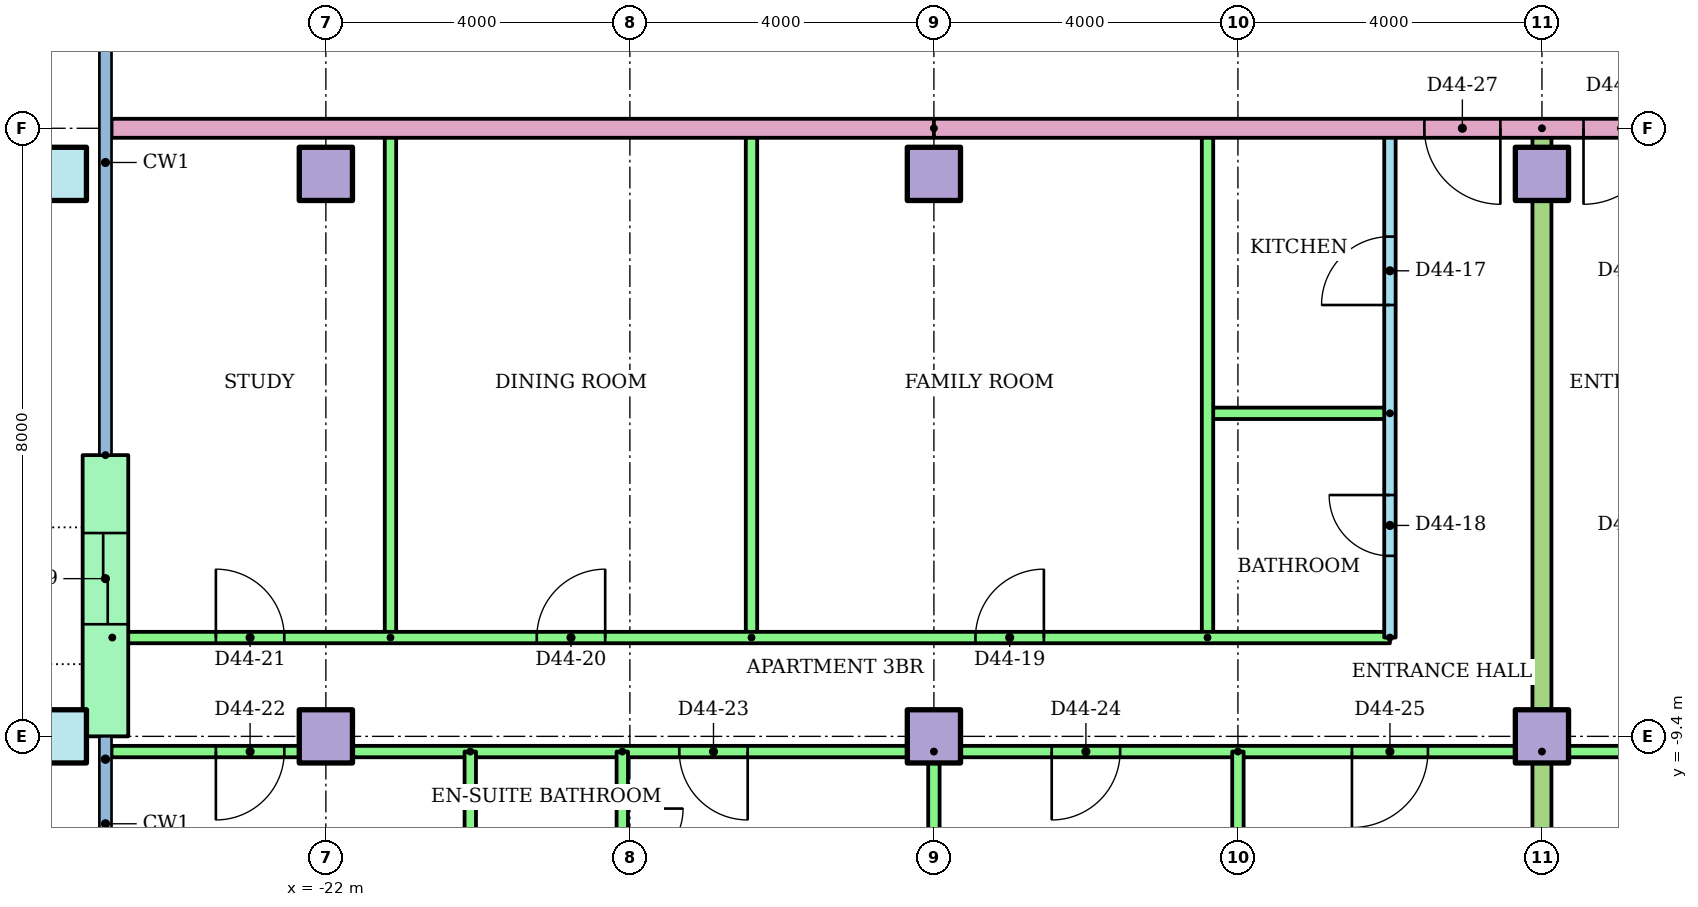
"""IFC4 building model, lengths in metres.
Left out: names, types, materials, properties, quantities, classifications, styles, units other than length and angle.
Written with IfcOpenShell. Run it as: python <this file> out.ifc"""

import sys

from ifc_helpers import new_model, si_unit, direction, frame, frame_2d, origin, origin_2d, place, context, subcontext, project, spatial, rectangle, hollow_rectangle, extrude, element, fill, save


model = new_model("IFC4")
c1 = context("Model", 3, precision=1e-05, world=origin(), true_north=direction((0.0, 1.0)))
c2 = subcontext(c1, "Body", "Model", "MODEL_VIEW")
j1 = project(units=[si_unit("LENGTHUNIT", "METRE"), si_unit("PLANEANGLEUNIT", "RADIAN")], contexts=[c1])
p1 = place(None, origin())
s1 = spatial("IfcSite", under=j1, at=p1, CompositionType="ELEMENT")
p2 = place(p1, origin())
s2 = spatial("IfcBuilding", under=s1, at=p2, CompositionType="ELEMENT")
p3 = place(p2, frame((0.0, 0.0, 171.7)))
s3 = spatial("IfcBuildingStorey", under=s2, at=p3, CompositionType="ELEMENT", Elevation=171.7)
p4 = place(p3, frame((-25.5, -9.4, 0.0)))
e1 = element("IfcColumn", 1, at=p4, inside=s3, PredefinedType="COLUMN", context=c2, shape_type="SweptSolid", body=[
    extrude(hollow_rectangle(XDim=0.7, YDim=0.7, WallThickness=0.036, at=origin_2d()), origin(), (0.0, 0.0, 1.0), 3.2),
])
for number, where in (
    (2, (-22.0, -9.4, 0.0)),
    (3, (-14.0, -9.4, 0.0)),
    (4, (-6.0, -9.4, 0.0)),
):
    element("IfcColumn", number, at=place(p3, frame(where)), inside=s3, PredefinedType="COLUMN", context=c2, shape_type="SweptSolid", body=[
        extrude(rectangle(XDim=0.7, YDim=0.7, at=origin_2d()), origin(), (0.0, 0.0, 1.0), 3.2),
    ])
p5 = place(p3, frame((-25.5, -2.0, 0.0)))
e5 = element("IfcColumn", 5, at=p5, inside=s3, PredefinedType="COLUMN", context=c2, shape_type="SweptSolid", body=[
    extrude(hollow_rectangle(XDim=0.7, YDim=0.7, WallThickness=0.036, at=origin_2d()), origin(), (0.0, 0.0, 1.0), 3.2),
])
for number, where in (
    (6, (-22.0, -2.0, 0.0)),
    (7, (-14.0, -2.0, 0.0)),
    (8, (-6.0, -2.0, 0.0)),
):
    element("IfcColumn", number, at=place(p3, frame(where)), inside=s3, PredefinedType="COLUMN", context=c2, shape_type="SweptSolid", body=[
        extrude(rectangle(XDim=0.7, YDim=0.7, at=origin_2d()), origin(), (0.0, 0.0, 1.0), 3.2),
    ])
p6 = place(p3, frame((-24.9, -5.7, 0.0), z_axis=(0.0, 0.0, 1.0), x_axis=(0.0, -1.0, 0.0)))
e9 = element("IfcWall", 9, at=p6, inside=s3, PredefinedType="STANDARD", context=c2, shape_type="SweptSolid", body=[
    extrude(rectangle(XDim=3.7, YDim=0.6, at=frame_2d((1.85, 0.0))), origin(), (0.0, 0.0, 1.0), 2.92),
])
p7 = place(p6, frame((1.025, 0.0, 0.0)))
e10 = element("IfcOpeningElement", 10, at=p7, cuts=e9, PredefinedType="OPENING", context=c2, shape_type="SweptSolid", body=[
    extrude(rectangle(XDim=1.2, YDim=2.1, at=frame_2d((0.6, 1.05))), frame((0.0, 0.31, 0.0), z_axis=(0.0, -1.0, 0.0), x_axis=(1.0, 0.0, 0.0)), (0.0, 0.0, 1.0), 0.62),
])
p8 = place(p3, frame((-8.0, -8.1, 0.0), z_axis=(0.0, 0.0, 1.0), x_axis=(0.0, 1.0, 0.0)))
e11 = element("IfcWall", 11, at=p8, inside=s3, PredefinedType="PARTITIONING", context=c2, shape_type="SweptSolid", body=[
    extrude(rectangle(XDim=6.7, YDim=0.15, at=frame_2d((3.35, 0.0))), origin(), (0.0, 0.0, 1.0), 2.4),
])
p9 = place(p8, frame((4.375, 0.0, 0.0)))
e12 = element("IfcOpeningElement", 12, at=p9, cuts=e11, PredefinedType="OPENING", context=c2, shape_type="SweptSolid", body=[
    extrude(rectangle(XDim=0.9, YDim=2.1, at=frame_2d((0.45, 1.05))), frame((0.0, 0.085, 0.0), z_axis=(0.0, -1.0, 0.0), x_axis=(1.0, 0.0, 0.0)), (0.0, 0.0, 1.0), 0.17),
])
p10 = place(p8, frame((1.075, 0.0, 0.0)))
e13 = element("IfcOpeningElement", 13, at=p10, cuts=e11, PredefinedType="OPENING", context=c2, shape_type="SweptSolid", body=[
    extrude(rectangle(XDim=0.8, YDim=2.1, at=frame_2d((0.4, 1.05))), frame((0.0, 0.085, 0.0), z_axis=(0.0, -1.0, 0.0), x_axis=(1.0, 0.0, 0.0)), (0.0, 0.0, 1.0), 0.17),
])
p11 = place(p3, frame((-8.0, -5.15, 0.0), z_axis=(0.0, 0.0, 1.0), x_axis=(-1.0, 0.0, 0.0)))
e14 = element("IfcWall", 14, at=p11, inside=s3, PredefinedType="PARTITIONING", context=c2, shape_type="SweptSolid", body=[
    extrude(rectangle(XDim=2.4, YDim=0.15, at=frame_2d((1.2, 0.0))), origin(), (0.0, 0.0, 1.0), 2.4),
])
for number, where, z_axis, x_axis in (
    (15, (-10.4, -8.1, 0.0), (0.0, 0.0, 1.0), (0.0, 1.0, 0.0)),
    (16, (-16.4, -8.1, 0.0), (0.0, 0.0, 1.0), (0.0, 1.0, 0.0)),
    (17, (-21.15, -8.1, 0.0), (0.0, 0.0, 1.0), (0.0, 1.0, 0.0)),
):
    element("IfcWall", number, at=place(p3, frame(where, z_axis=z_axis, x_axis=x_axis)), inside=s3, PredefinedType="PARTITIONING", context=c2, shape_type="SweptSolid", body=[
        extrude(rectangle(XDim=6.7, YDim=0.15, at=frame_2d((3.35, 0.0))), origin(), (0.0, 0.0, 1.0), 2.4),
    ])
p12 = place(p3, frame((-24.81, -8.1, 0.0)))
e18 = element("IfcWall", 18, at=p12, inside=s3, PredefinedType="PARTITIONING", context=c2, shape_type="SweptSolid", body=[
    extrude(rectangle(XDim=16.81, YDim=0.15, at=frame_2d((8.405, 0.0))), origin(), (0.0, 0.0, 1.0), 2.4),
])
p13 = place(p12, frame((11.357, 0.0, 0.0)))
e19 = element("IfcOpeningElement", 19, at=p13, cuts=e18, PredefinedType="OPENING", context=c2, shape_type="SweptSolid", body=[
    extrude(rectangle(XDim=0.9, YDim=2.1, at=frame_2d((0.45, 1.05))), frame((0.0, 0.085, 0.0), z_axis=(0.0, -1.0, 0.0), x_axis=(1.0, 0.0, 0.0)), (0.0, 0.0, 1.0), 0.17),
])
p14 = place(p12, frame((5.585, 0.0, 0.0)))
e20 = element("IfcOpeningElement", 20, at=p14, cuts=e18, PredefinedType="OPENING", context=c2, shape_type="SweptSolid", body=[
    extrude(rectangle(XDim=0.9, YDim=2.1, at=frame_2d((0.45, 1.05))), frame((0.0, 0.085, 0.0), z_axis=(0.0, -1.0, 0.0), x_axis=(1.0, 0.0, 0.0)), (0.0, 0.0, 1.0), 0.17),
])
p15 = place(p12, frame((1.363, 0.0, 0.0)))
e21 = element("IfcOpeningElement", 21, at=p15, cuts=e18, PredefinedType="OPENING", context=c2, shape_type="SweptSolid", body=[
    extrude(rectangle(XDim=0.9, YDim=2.1, at=frame_2d((0.45, 1.05))), frame((0.0, 0.085, 0.0), z_axis=(0.0, -1.0, 0.0), x_axis=(1.0, 0.0, 0.0)), (0.0, 0.0, 1.0), 0.17),
])
p16 = place(p3, frame((-6.0, -9.6, 0.0), z_axis=(0.0, 0.0, 1.0), x_axis=(-1.0, 0.0, 0.0)))
e22 = element("IfcWall", 22, at=p16, inside=s3, PredefinedType="PARTITIONING", context=c2, shape_type="SweptSolid", body=[
    extrude(rectangle(XDim=18.82, YDim=0.15, at=frame_2d((9.41, 0.0))), origin(), (0.0, 0.0, 1.0), 2.4),
])
p17 = place(p16, frame((16.547, 0.0, 0.0)))
e23 = element("IfcOpeningElement", 23, at=p17, cuts=e22, PredefinedType="OPENING", context=c2, shape_type="SweptSolid", body=[
    extrude(rectangle(XDim=0.9, YDim=2.1, at=frame_2d((0.45, 1.05))), frame((0.0, 0.085, 0.0), z_axis=(0.0, -1.0, 0.0), x_axis=(1.0, 0.0, 0.0)), (0.0, 0.0, 1.0), 0.17),
])
p18 = place(p16, frame((10.45, 0.0, 0.0)))
e24 = element("IfcOpeningElement", 24, at=p18, cuts=e22, PredefinedType="OPENING", context=c2, shape_type="SweptSolid", body=[
    extrude(rectangle(XDim=0.9, YDim=2.1, at=frame_2d((0.45, 1.05))), frame((0.0, 0.085, 0.0), z_axis=(0.0, -1.0, 0.0), x_axis=(1.0, 0.0, 0.0)), (0.0, 0.0, 1.0), 0.17),
])
p19 = place(p16, frame((5.55, 0.0, 0.0)))
e25 = element("IfcOpeningElement", 25, at=p19, cuts=e22, PredefinedType="OPENING", context=c2, shape_type="SweptSolid", body=[
    extrude(rectangle(XDim=0.9, YDim=2.1, at=frame_2d((0.45, 1.05))), frame((0.0, 0.085, 0.0), z_axis=(0.0, -1.0, 0.0), x_axis=(1.0, 0.0, 0.0)), (0.0, 0.0, 1.0), 0.17),
])
p20 = place(p16, frame((1.5, 0.0, 0.0)))
e26 = element("IfcOpeningElement", 26, at=p20, cuts=e22, PredefinedType="OPENING", context=c2, shape_type="SweptSolid", body=[
    extrude(rectangle(XDim=1.0, YDim=2.1, at=frame_2d((0.5, 1.05))), frame((0.0, 0.085, 0.0), z_axis=(0.0, -1.0, 0.0), x_axis=(1.0, 0.0, 0.0)), (0.0, 0.0, 1.0), 0.17),
])
p21 = place(p3, frame((-20.1, -9.6, 0.0), z_axis=(0.0, 0.0, 1.0), x_axis=(0.0, -1.0, 0.0)))
e27 = element("IfcWall", 27, at=p21, inside=s3, PredefinedType="PARTITIONING", context=c2, shape_type="SweptSolid", body=[
    extrude(rectangle(XDim=5.02, YDim=0.15, at=frame_2d((2.51, 0.0))), origin(), (0.0, 0.0, 1.0), 2.4),
])
p22 = place(p3, frame((-14.0, -9.6, 0.0), z_axis=(0.0, 0.0, 1.0), x_axis=(0.0, -1.0, 0.0)))
e28 = element("IfcWall", 28, at=p22, inside=s3, PredefinedType="PARTITIONING", context=c2, shape_type="SweptSolid", body=[
    extrude(rectangle(XDim=6.81, YDim=0.15, at=frame_2d((3.405, 0.0))), origin(), (0.0, 0.0, 1.0), 2.4),
])
p23 = place(p3, frame((-10.0, -9.6, 0.0), z_axis=(0.0, 0.0, 1.0), x_axis=(0.0, -1.0, 0.0)))
e29 = element("IfcWall", 29, at=p23, inside=s3, PredefinedType="PARTITIONING", context=c2, shape_type="SweptSolid", body=[
    extrude(rectangle(XDim=6.821, YDim=0.15, at=frame_2d((3.41, 0.0))), origin(), (0.0, 0.0, 1.0), 2.4),
])
p24 = place(p3, frame((-18.1, -9.6, 0.0), z_axis=(0.0, 0.0, 1.0), x_axis=(0.0, -1.0, 0.0)))
e30 = element("IfcWall", 30, at=p24, inside=s3, PredefinedType="PARTITIONING", context=c2, shape_type="SweptSolid", body=[
    extrude(rectangle(XDim=2.3, YDim=0.15, at=frame_2d((1.15, 0.0))), origin(), (0.0, 0.0, 1.0), 2.4),
])
p25 = place(p24, frame((0.75, 0.0, 0.0)))
e31 = element("IfcOpeningElement", 31, at=p25, cuts=e30, PredefinedType="OPENING", context=c2, shape_type="SweptSolid", body=[
    extrude(rectangle(XDim=0.8, YDim=2.1, at=frame_2d((0.4, 1.05))), frame((0.0, 0.085, 0.0), z_axis=(0.0, -1.0, 0.0), x_axis=(1.0, 0.0, 0.0)), (0.0, 0.0, 1.0), 0.17),
])
p26 = place(p3, frame((10.0, -9.6, 0.0), z_axis=(0.0, 0.0, 1.0), x_axis=(-1.0, 0.0, 0.0)))
e32 = element("IfcWall", 32, at=p26, inside=s3, PredefinedType="PARTITIONING", context=c2, shape_type="SweptSolid", body=[
    extrude(rectangle(XDim=16.0, YDim=0.15, at=frame_2d((8.0, 0.0))), origin(), (0.0, 0.0, 1.0), 2.4),
])
p27 = place(p26, frame((11.5, 0.0, 0.0)))
e33 = element("IfcOpeningElement", 33, at=p27, cuts=e32, PredefinedType="OPENING", context=c2, shape_type="SweptSolid", body=[
    extrude(rectangle(XDim=1.0, YDim=2.1, at=frame_2d((0.5, 1.05))), frame((0.0, 0.085, 0.0), z_axis=(0.0, -1.0, 0.0), x_axis=(1.0, 0.0, 0.0)), (0.0, 0.0, 1.0), 0.17),
])
p28 = place(p26, frame((5.55, 0.0, 0.0)))
e34 = element("IfcOpeningElement", 34, at=p28, cuts=e32, PredefinedType="OPENING", context=c2, shape_type="SweptSolid", body=[
    extrude(rectangle(XDim=0.9, YDim=2.1, at=frame_2d((0.45, 1.05))), frame((0.0, 0.085, 0.0), z_axis=(0.0, -1.0, 0.0), x_axis=(1.0, 0.0, 0.0)), (0.0, 0.0, 1.0), 0.17),
])
p29 = place(p26, frame((1.55, 0.0, 0.0)))
e35 = element("IfcOpeningElement", 35, at=p29, cuts=e32, PredefinedType="OPENING", context=c2, shape_type="SweptSolid", body=[
    extrude(rectangle(XDim=0.9, YDim=2.1, at=frame_2d((0.45, 1.05))), frame((0.0, 0.085, 0.0), z_axis=(0.0, -1.0, 0.0), x_axis=(1.0, 0.0, 0.0)), (0.0, 0.0, 1.0), 0.17),
])
p30 = place(p3, frame((-6.0, -1.4, 0.0), z_axis=(0.0, 0.0, 1.0), x_axis=(0.0, -1.0, 0.0)))
e36 = element("IfcWall", 36, at=p30, inside=s3, PredefinedType="PARTITIONING", context=c2, shape_type="SweptSolid", body=[
    extrude(rectangle(XDim=15.01, YDim=0.25, at=frame_2d((7.505, 0.0))), origin(), (0.0, 0.0, 1.0), 2.4),
])
p31 = place(p3, frame((-14.0, -1.4, 0.0), z_axis=(0.0, 0.0, 1.0), x_axis=(-1.0, 0.0, 0.0)))
e37 = element("IfcWall", 37, at=p31, inside=s3, PredefinedType="PARTITIONING", context=c2, shape_type="SweptSolid", body=[
    extrude(rectangle(XDim=10.82, YDim=0.25, at=frame_2d((5.41, 0.0))), origin(), (0.0, 0.0, 1.0), 2.4),
])
p32 = place(p3, frame((14.0, -1.4, 0.0), z_axis=(0.0, 0.0, 1.0), x_axis=(-1.0, 0.0, 0.0)))
e38 = element("IfcWall", 38, at=p32, inside=s3, PredefinedType="PARTITIONING", context=c2, shape_type="SweptSolid", body=[
    extrude(rectangle(XDim=28.0, YDim=0.25, at=frame_2d((14.0, 0.0))), origin(), (0.0, 0.0, 1.0), 2.4),
])
p33 = place(p32, frame((20.547, 0.0, 0.0)))
e39 = element("IfcOpeningElement", 39, at=p33, cuts=e38, PredefinedType="OPENING", context=c2, shape_type="SweptSolid", body=[
    extrude(rectangle(XDim=1.0, YDim=2.1, at=frame_2d((0.5, 1.05))), frame((0.0, 0.135, 0.0), z_axis=(0.0, -1.0, 0.0), x_axis=(1.0, 0.0, 0.0)), (0.0, 0.0, 1.0), 0.27),
])
p34 = place(p32, frame((18.453, 0.0, 0.0)))
e40 = element("IfcOpeningElement", 40, at=p34, cuts=e38, PredefinedType="OPENING", context=c2, shape_type="SweptSolid", body=[
    extrude(rectangle(XDim=1.0, YDim=2.1, at=frame_2d((0.5, 1.05))), frame((0.0, 0.135, 0.0), z_axis=(0.0, -1.0, 0.0), x_axis=(1.0, 0.0, 0.0)), (0.0, 0.0, 1.0), 0.27),
])
p35 = place(p32, frame((2.453, 0.0, 0.0)))
e41 = element("IfcOpeningElement", 41, at=p35, cuts=e38, PredefinedType="OPENING", context=c2, shape_type="SweptSolid", body=[
    extrude(rectangle(XDim=1.0, YDim=2.1, at=frame_2d((0.5, 1.05))), frame((0.0, 0.135, 0.0), z_axis=(0.0, -1.0, 0.0), x_axis=(1.0, 0.0, 0.0)), (0.0, 0.0, 1.0), 0.27),
])
p36 = place(p9, origin())
e42 = element("IfcDoor", 42, at=p36, inside=s3, OperationType="SINGLE_SWING_LEFT", PredefinedType="DOOR", context=c2, shape_type="SweptSolid", body=[
    extrude(rectangle(XDim=0.9, YDim=2.1, at=frame_2d((0.45, 1.05))), frame((0.0, 0.025, 0.0), z_axis=(0.0, -1.0, 0.0), x_axis=(1.0, 0.0, 0.0)), (0.0, 0.0, 1.0), 0.05),
])
fill(e12, e42)
p37 = place(p10, origin())
e43 = element("IfcDoor", 43, at=p37, inside=s3, OperationType="SINGLE_SWING_RIGHT", PredefinedType="DOOR", context=c2, shape_type="SweptSolid", body=[
    extrude(rectangle(XDim=0.8, YDim=2.1, at=frame_2d((0.4, 1.05))), frame((0.0, 0.025, 0.0), z_axis=(0.0, -1.0, 0.0), x_axis=(1.0, 0.0, 0.0)), (0.0, 0.0, 1.0), 0.05),
])
fill(e13, e43)
p38 = place(p13, origin())
e44 = element("IfcDoor", 44, at=p38, inside=s3, OperationType="SINGLE_SWING_RIGHT", PredefinedType="DOOR", context=c2, shape_type="SweptSolid", body=[
    extrude(rectangle(XDim=0.9, YDim=2.1, at=frame_2d((0.45, 1.05))), frame((0.0, 0.025, 0.0), z_axis=(0.0, -1.0, 0.0), x_axis=(1.0, 0.0, 0.0)), (0.0, 0.0, 1.0), 0.05),
])
fill(e19, e44)
p39 = place(p14, origin())
e45 = element("IfcDoor", 45, at=p39, inside=s3, OperationType="SINGLE_SWING_RIGHT", PredefinedType="DOOR", context=c2, shape_type="SweptSolid", body=[
    extrude(rectangle(XDim=0.9, YDim=2.1, at=frame_2d((0.45, 1.05))), frame((0.0, 0.025, 0.0), z_axis=(0.0, -1.0, 0.0), x_axis=(1.0, 0.0, 0.0)), (0.0, 0.0, 1.0), 0.05),
])
fill(e20, e45)
p40 = place(p15, origin())
e46 = element("IfcDoor", 46, at=p40, inside=s3, OperationType="SINGLE_SWING_LEFT", PredefinedType="DOOR", context=c2, shape_type="SweptSolid", body=[
    extrude(rectangle(XDim=0.9, YDim=2.1, at=frame_2d((0.45, 1.05))), frame((0.0, 0.025, 0.0), z_axis=(0.0, -1.0, 0.0), x_axis=(1.0, 0.0, 0.0)), (0.0, 0.0, 1.0), 0.05),
])
fill(e21, e46)
p41 = place(p17, origin())
e47 = element("IfcDoor", 47, at=p41, inside=s3, OperationType="SINGLE_SWING_RIGHT", PredefinedType="DOOR", context=c2, shape_type="SweptSolid", body=[
    extrude(rectangle(XDim=0.9, YDim=2.1, at=frame_2d((0.45, 1.05))), frame((0.0, 0.025, 0.0), z_axis=(0.0, -1.0, 0.0), x_axis=(1.0, 0.0, 0.0)), (0.0, 0.0, 1.0), 0.05),
])
fill(e23, e47)
p42 = place(p18, origin())
e48 = element("IfcDoor", 48, at=p42, inside=s3, OperationType="SINGLE_SWING_LEFT", PredefinedType="DOOR", context=c2, shape_type="SweptSolid", body=[
    extrude(rectangle(XDim=0.9, YDim=2.1, at=frame_2d((0.45, 1.05))), frame((0.0, 0.025, 0.0), z_axis=(0.0, -1.0, 0.0), x_axis=(1.0, 0.0, 0.0)), (0.0, 0.0, 1.0), 0.05),
])
fill(e24, e48)
p43 = place(p19, origin())
e49 = element("IfcDoor", 49, at=p43, inside=s3, OperationType="SINGLE_SWING_RIGHT", PredefinedType="DOOR", context=c2, shape_type="SweptSolid", body=[
    extrude(rectangle(XDim=0.9, YDim=2.1, at=frame_2d((0.45, 1.05))), frame((0.0, 0.025, 0.0), z_axis=(0.0, -1.0, 0.0), x_axis=(1.0, 0.0, 0.0)), (0.0, 0.0, 1.0), 0.05),
])
fill(e25, e49)
p44 = place(p20, origin())
e50 = element("IfcDoor", 50, at=p44, inside=s3, OperationType="SINGLE_SWING_RIGHT", PredefinedType="DOOR", context=c2, shape_type="SweptSolid", body=[
    extrude(rectangle(XDim=1.0, YDim=2.1, at=frame_2d((0.5, 1.05))), frame((0.0, 0.025, 0.0), z_axis=(0.0, -1.0, 0.0), x_axis=(1.0, 0.0, 0.0)), (0.0, 0.0, 1.0), 0.05),
])
fill(e26, e50)
p45 = place(p25, origin())
e51 = element("IfcDoor", 51, at=p45, inside=s3, OperationType="SINGLE_SWING_LEFT", PredefinedType="DOOR", context=c2, shape_type="SweptSolid", body=[
    extrude(rectangle(XDim=0.8, YDim=2.1, at=frame_2d((0.4, 1.05))), frame((0.0, 0.025, 0.0), z_axis=(0.0, -1.0, 0.0), x_axis=(1.0, 0.0, 0.0)), (0.0, 0.0, 1.0), 0.05),
])
fill(e31, e51)
p46 = place(p33, origin())
e52 = element("IfcDoor", 52, at=p46, inside=s3, OperationType="SINGLE_SWING_LEFT", PredefinedType="DOOR", context=c2, shape_type="SweptSolid", body=[
    extrude(rectangle(XDim=1.0, YDim=2.1, at=frame_2d((0.5, 1.05))), frame((0.0, 0.025, 0.0), z_axis=(0.0, -1.0, 0.0), x_axis=(1.0, 0.0, 0.0)), (0.0, 0.0, 1.0), 0.05),
])
fill(e39, e52)
p47 = place(p34, origin())
e53 = element("IfcDoor", 53, at=p47, inside=s3, OperationType="SINGLE_SWING_RIGHT", PredefinedType="DOOR", context=c2, shape_type="SweptSolid", body=[
    extrude(rectangle(XDim=1.0, YDim=2.1, at=frame_2d((0.5, 1.05))), frame((0.0, 0.025, 0.0), z_axis=(0.0, -1.0, 0.0), x_axis=(1.0, 0.0, 0.0)), (0.0, 0.0, 1.0), 0.05),
])
fill(e40, e53)
p48 = place(p7, origin())
e54 = element("IfcDoor", 54, at=p48, inside=s3, OperationType="SLIDING_TO_LEFT", PredefinedType="DOOR", context=c2, shape_type="SweptSolid", body=[
    extrude(rectangle(XDim=1.2, YDim=2.1, at=frame_2d((0.6, 1.05))), frame((0.0, 0.025, 0.0), z_axis=(0.0, -1.0, 0.0), x_axis=(1.0, 0.0, 0.0)), (0.0, 0.0, 1.0), 0.05),
])
fill(e10, e54)
save(model, sys.argv[1])
